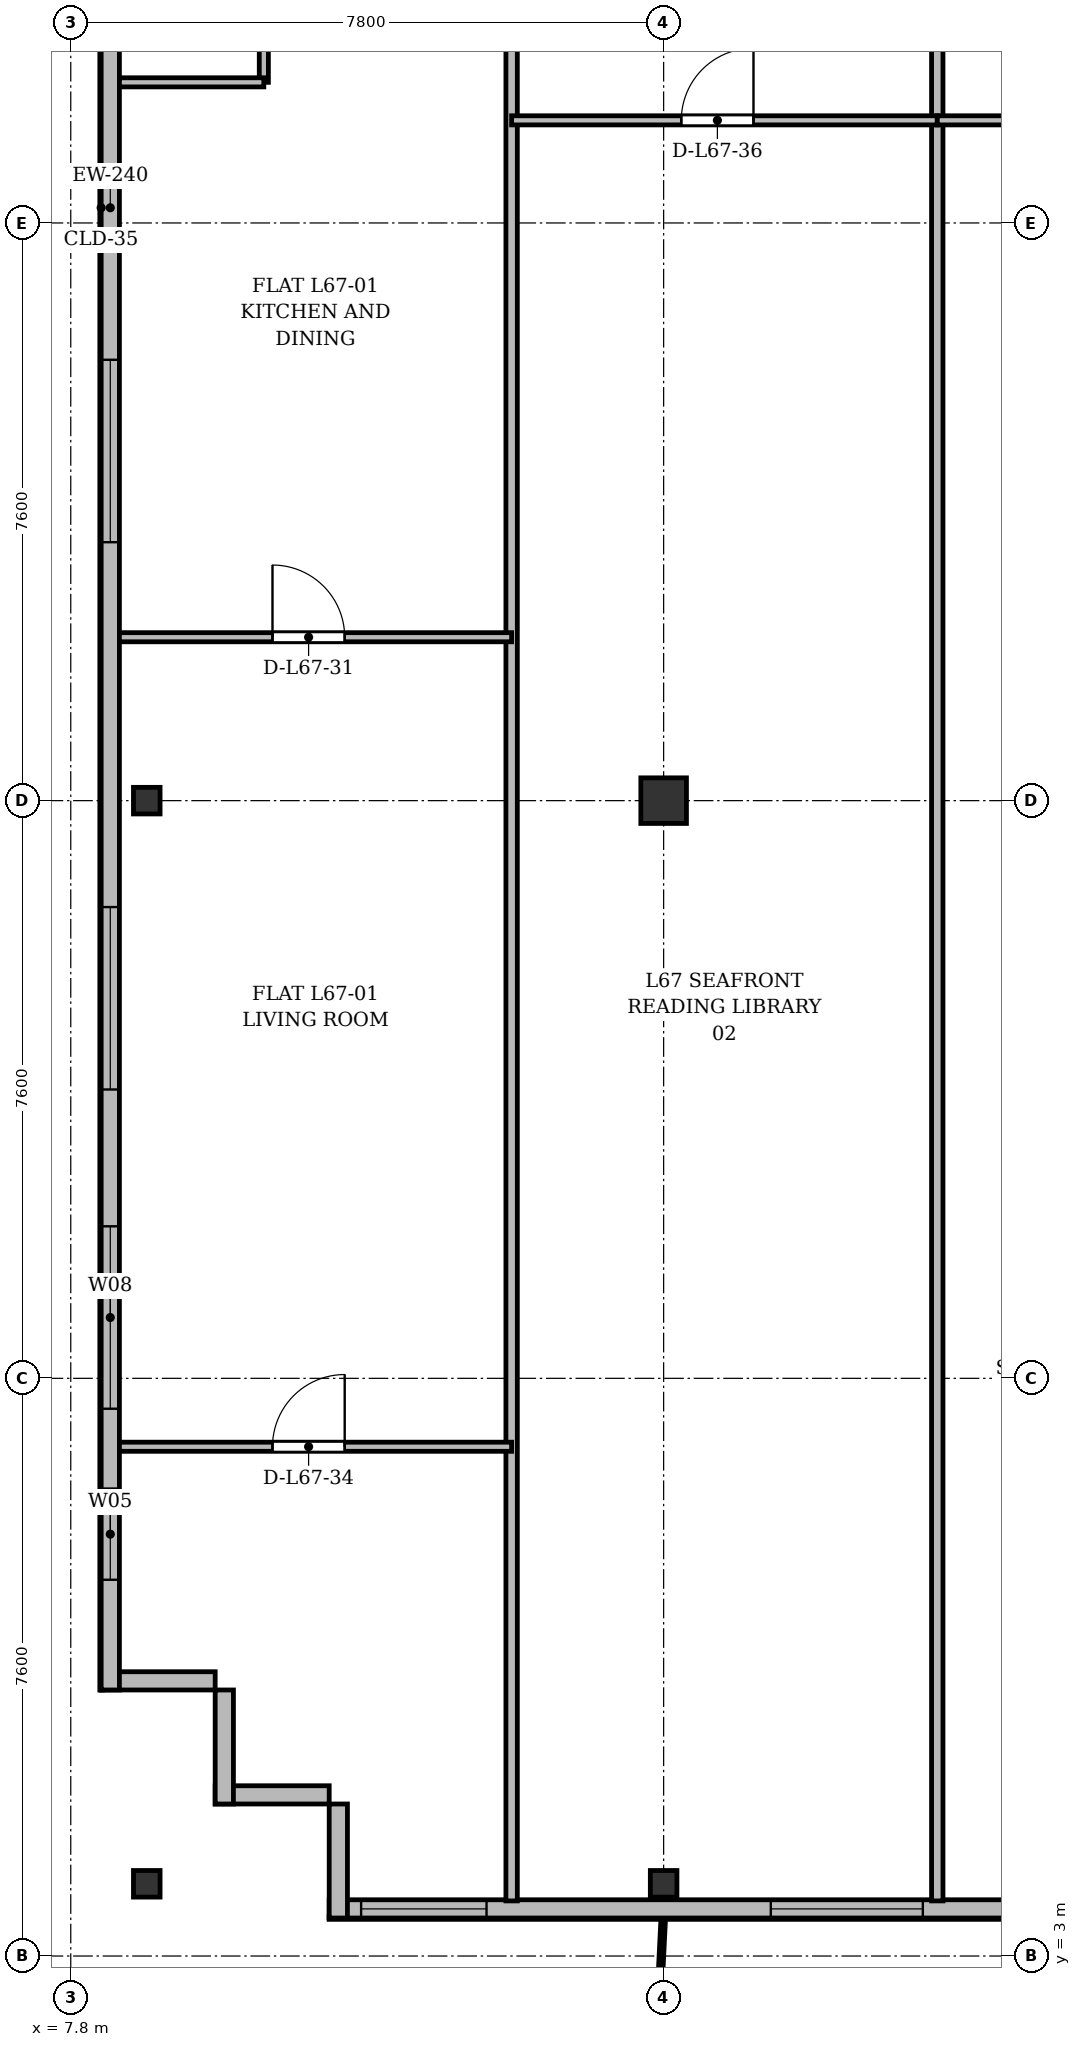
"""IFC4 building model, lengths in metres.
Left out: names, types, materials, properties, quantities, classifications, styles, units other than length and angle.
Written with IfcOpenShell. Run it as: python <this file> out.ifc"""

import sys

from ifc_helpers import new_model, si_unit, direction, frame, frame_2d, origin, origin_2d, place, context, subcontext, project, spatial, rectangle, i_section, extrude, source, transform, mapped, element, fill, save


model = new_model("IFC4")
c1 = context("Model", 3, precision=1e-05, world=origin(), true_north=direction((0.0, 1.0)))
c2 = subcontext(c1, "Body", "Model", "MODEL_VIEW")
j1 = project(units=[si_unit("LENGTHUNIT", "METRE"), si_unit("PLANEANGLEUNIT", "RADIAN")], contexts=[c1])
p1 = place(None, origin())
s1 = spatial("IfcSite", under=j1, at=p1, CompositionType="ELEMENT")
p2 = place(p1, origin())
s2 = spatial("IfcBuilding", under=s1, at=p2, CompositionType="ELEMENT")
p3 = place(p2, frame((0.0, 0.0, 259.5)))
s3 = spatial("IfcBuildingStorey", under=s2, at=p3, CompositionType="ELEMENT", Elevation=259.5)
m1 = source(origin(), c2, "Body", "SweptSolid", [
    extrude(i_section(OverallWidth=0.35, OverallDepth=0.35, WebThickness=0.018, FlangeThickness=0.028, at=origin_2d()), origin(), (0.0, 0.0, 1.0), 3.6),
])
for number, where, z_axis, x_axis in (
    (1, (8.8, 3.95, 0.0), (0.0, 0.0, 1.0), (1.0, 0.0, 0.0)),
    (2, (8.8, 18.2, 0.0), (0.0, 0.0, 1.0), (1.0, 0.0, 0.0)),
    (3, (15.6, 3.95, 0.0), (0.0, 0.0, 1.0), (1.0, 0.0, 0.0)),
):
    element("IfcColumn", number, at=place(p3, frame(where, z_axis=z_axis, x_axis=x_axis)), inside=s3, PredefinedType="COLUMN", context=c2, shape_type="MappedRepresentation", body=[
        mapped(m1, transform((0.0, 0.0, 0.0), x_axis=(1.0, 0.0, 0.0), y_axis=(0.0, 1.0, 0.0), z_axis=(0.0, 0.0, 1.0), scale=1.0)),
    ])
m2 = source(origin(), c2, "Body", "SweptSolid", [
    extrude(rectangle(XDim=0.6, YDim=0.6, at=origin_2d()), origin(), (0.0, 0.0, 1.0), 3.6),
])
p4 = place(p3, frame((15.6, 18.2, 0.0), z_axis=(0.0, 0.0, 1.0), x_axis=(1.0, 0.0, 0.0)))
e4 = element("IfcColumn", 4, at=p4, inside=s3, PredefinedType="COLUMN", context=c2, shape_type="MappedRepresentation", body=[
    mapped(m2, transform((0.0, 0.0, 0.0), x_axis=(1.0, 0.0, 0.0), y_axis=(0.0, 1.0, 0.0), z_axis=(0.0, 0.0, 1.0), scale=1.0)),
])
for number, where, z_axis, x_axis in (
    (5, (11.2, 5.12, 0.0), (0.0, 0.0, 1.0), (-1.0, 0.0, 0.0)),
    (6, (9.82, 5.0, 0.0), (0.0, 0.0, 1.0), (0.0, 1.0, 0.0)),
):
    element("IfcWall", number, at=place(p3, frame(where, z_axis=z_axis, x_axis=x_axis)), inside=s3, PredefinedType="SOLIDWALL", context=c2, shape_type="SweptSolid", body=[
        extrude(rectangle(XDim=1.5, YDim=0.24, at=frame_2d((0.75, 0.0))), origin(), (0.0, 0.0, 1.0), 3.37),
    ])
p5 = place(p3, frame((9.7, 6.62, 0.0), z_axis=(0.0, 0.0, 1.0), x_axis=(-1.0, 0.0, 0.0)))
e7 = element("IfcWall", 7, at=p5, inside=s3, PredefinedType="SOLIDWALL", context=c2, shape_type="SweptSolid", body=[
    extrude(rectangle(XDim=1.5, YDim=0.24, at=frame_2d((0.75, 0.0))), origin(), (0.0, 0.0, 1.0), 2.87),
])
p6 = place(p3, frame((8.32, 6.5, 0.0), z_axis=(0.0, 0.0, 1.0), x_axis=(0.0, 1.0, 0.0)))
e8 = element("IfcWall", 8, at=p6, inside=s3, PredefinedType="SOLIDWALL", context=c2, shape_type="SweptSolid", body=[
    extrude(rectangle(XDim=39.0, YDim=0.24, at=frame_2d((19.5, 0.0))), origin(), (0.0, 0.0, 1.0), 3.37),
])
p7 = place(p6, frame((1.45, 0.0, 0.92)))
e9 = element("IfcOpeningElement", 9, at=p7, cuts=e8, PredefinedType="OPENING", context=c2, shape_type="SweptSolid", body=[
    extrude(rectangle(XDim=1.2, YDim=1.65, at=frame_2d((0.6, 0.825))), frame((0.0, 0.13, 0.0), z_axis=(0.0, -1.0, 0.0), x_axis=(1.0, 0.0, 0.0)), (0.0, 0.0, 1.0), 0.26),
])
p8 = place(p6, frame((3.7, 0.0, 0.92)))
e10 = element("IfcOpeningElement", 10, at=p8, cuts=e8, PredefinedType="OPENING", context=c2, shape_type="SweptSolid", body=[
    extrude(rectangle(XDim=2.4, YDim=2.1, at=frame_2d((1.2, 1.05))), frame((0.0, 0.13, 0.0), z_axis=(0.0, -1.0, 0.0), x_axis=(1.0, 0.0, 0.0)), (0.0, 0.0, 1.0), 0.26),
])
p9 = place(p6, frame((7.9, 0.0, 0.92)))
e11 = element("IfcOpeningElement", 11, at=p9, cuts=e8, PredefinedType="OPENING", context=c2, shape_type="SweptSolid", body=[
    extrude(rectangle(XDim=2.4, YDim=2.1, at=frame_2d((1.2, 1.05))), frame((0.0, 0.13, 0.0), z_axis=(0.0, -1.0, 0.0), x_axis=(1.0, 0.0, 0.0)), (0.0, 0.0, 1.0), 0.26),
])
p10 = place(p6, frame((15.1, 0.0, 0.92)))
e12 = element("IfcOpeningElement", 12, at=p10, cuts=e8, PredefinedType="OPENING", context=c2, shape_type="SweptSolid", body=[
    extrude(rectangle(XDim=2.4, YDim=2.1, at=frame_2d((1.2, 1.05))), frame((0.0, 0.13, 0.0), z_axis=(0.0, -1.0, 0.0), x_axis=(1.0, 0.0, 0.0)), (0.0, 0.0, 1.0), 0.26),
])
p11 = place(p6, frame((33.3, 0.0, 0.92)))
e13 = element("IfcOpeningElement", 13, at=p11, cuts=e8, PredefinedType="OPENING", context=c2, shape_type="SweptSolid", body=[
    extrude(rectangle(XDim=1.2, YDim=1.65, at=frame_2d((0.6, 0.825))), frame((0.0, 0.13, 0.0), z_axis=(0.0, -1.0, 0.0), x_axis=(1.0, 0.0, 0.0)), (0.0, 0.0, 1.0), 0.26),
])
p12 = place(p6, frame((36.65, 0.0, 0.92)))
e14 = element("IfcOpeningElement", 14, at=p12, cuts=e8, PredefinedType="OPENING", context=c2, shape_type="SweptSolid", body=[
    extrude(rectangle(XDim=1.2, YDim=1.65, at=frame_2d((0.6, 0.825))), frame((0.0, 0.13, 0.0), z_axis=(0.0, -1.0, 0.0), x_axis=(1.0, 0.0, 0.0)), (0.0, 0.0, 1.0), 0.26),
])
p13 = place(p3, frame((63.2, 3.62, 0.0), z_axis=(0.0, 0.0, 1.0), x_axis=(-1.0, 0.0, 0.0)))
e15 = element("IfcWall", 15, at=p13, inside=s3, PredefinedType="SOLIDWALL", context=c2, shape_type="SweptSolid", body=[
    extrude(rectangle(XDim=52.0, YDim=0.24, at=frame_2d((26.0, 0.0))), origin(), (0.0, 0.0, 1.0), 3.37),
])
p14 = place(p13, frame((0.345, 0.0, 0.9)))
e16 = element("IfcOpeningElement", 16, at=p14, cuts=e15, PredefinedType="OPENING", context=c2, shape_type="SweptSolid", body=[
    extrude(rectangle(XDim=1.2, YDim=1.65, at=frame_2d((0.6, 0.825))), frame((0.0, 0.13, 0.0), z_axis=(0.0, -1.0, 0.0), x_axis=(1.0, 0.0, 0.0)), (0.0, 0.0, 1.0), 0.26),
])
p15 = place(p13, frame((2.05, 0.0, 0.9)))
e17 = element("IfcOpeningElement", 17, at=p15, cuts=e15, PredefinedType="OPENING", context=c2, shape_type="SweptSolid", body=[
    extrude(rectangle(XDim=2.0, YDim=1.95, at=frame_2d((1.0, 0.975))), frame((0.0, 0.13, 0.0), z_axis=(0.0, -1.0, 0.0), x_axis=(1.0, 0.0, 0.0)), (0.0, 0.0, 1.0), 0.26),
])
p16 = place(p13, frame((5.42, 0.0, 0.0)))
e18 = element("IfcOpeningElement", 18, at=p16, cuts=e15, PredefinedType="OPENING", context=c2, shape_type="SweptSolid", body=[
    extrude(rectangle(XDim=1.2, YDim=2.2, at=frame_2d((0.6, 1.1))), frame((0.0, 0.13, 0.0), z_axis=(0.0, -1.0, 0.0), x_axis=(1.0, 0.0, 0.0)), (0.0, 0.0, 1.0), 0.26),
])
p17 = place(p13, frame((8.6, 0.0, 0.9)))
e19 = element("IfcOpeningElement", 19, at=p17, cuts=e15, PredefinedType="OPENING", context=c2, shape_type="SweptSolid", body=[
    extrude(rectangle(XDim=1.8, YDim=1.8, at=frame_2d((0.9, 0.9))), frame((0.0, 0.13, 0.0), z_axis=(0.0, -1.0, 0.0), x_axis=(1.0, 0.0, 0.0)), (0.0, 0.0, 1.0), 0.26),
])
p18 = place(p13, frame((14.7, 0.0, 0.9)))
e20 = element("IfcOpeningElement", 20, at=p18, cuts=e15, PredefinedType="OPENING", context=c2, shape_type="SweptSolid", body=[
    extrude(rectangle(XDim=2.2, YDim=1.8, at=frame_2d((1.1, 0.9))), frame((0.0, 0.13, 0.0), z_axis=(0.0, -1.0, 0.0), x_axis=(1.0, 0.0, 0.0)), (0.0, 0.0, 1.0), 0.26),
])
p19 = place(p13, frame((20.5, 0.0, 0.9)))
e21 = element("IfcOpeningElement", 21, at=p19, cuts=e15, PredefinedType="OPENING", context=c2, shape_type="SweptSolid", body=[
    extrude(rectangle(XDim=1.5, YDim=1.75, at=frame_2d((0.75, 0.875))), frame((0.0, 0.13, 0.0), z_axis=(0.0, -1.0, 0.0), x_axis=(1.0, 0.0, 0.0)), (0.0, 0.0, 1.0), 0.26),
])
p20 = place(p13, frame((23.95, 0.0, 0.9)))
e22 = element("IfcOpeningElement", 22, at=p20, cuts=e15, PredefinedType="OPENING", context=c2, shape_type="SweptSolid", body=[
    extrude(rectangle(XDim=2.0, YDim=1.95, at=frame_2d((1.0, 0.975))), frame((0.0, 0.13, 0.0), z_axis=(0.0, -1.0, 0.0), x_axis=(1.0, 0.0, 0.0)), (0.0, 0.0, 1.0), 0.26),
])
p21 = place(p13, frame((28.875, 0.0, 0.9)))
e23 = element("IfcOpeningElement", 23, at=p21, cuts=e15, PredefinedType="OPENING", context=c2, shape_type="SweptSolid", body=[
    extrude(rectangle(XDim=1.65, YDim=1.85, at=frame_2d((0.825, 0.925))), frame((0.0, 0.13, 0.0), z_axis=(0.0, -1.0, 0.0), x_axis=(1.0, 0.0, 0.0)), (0.0, 0.0, 1.0), 0.26),
])
p22 = place(p13, frame((34.078, 0.0, 0.0)))
e24 = element("IfcOpeningElement", 24, at=p22, cuts=e15, PredefinedType="OPENING", context=c2, shape_type="SweptSolid", body=[
    extrude(rectangle(XDim=1.2, YDim=2.2, at=frame_2d((0.6, 1.1))), frame((0.0, 0.13, 0.0), z_axis=(0.0, -1.0, 0.0), x_axis=(1.0, 0.0, 0.0)), (0.0, 0.0, 1.0), 0.26),
])
p23 = place(p13, frame((36.9, 0.0, 0.9)))
e25 = element("IfcOpeningElement", 25, at=p23, cuts=e15, PredefinedType="OPENING", context=c2, shape_type="SweptSolid", body=[
    extrude(rectangle(XDim=2.2, YDim=1.8, at=frame_2d((1.1, 0.9))), frame((0.0, 0.13, 0.0), z_axis=(0.0, -1.0, 0.0), x_axis=(1.0, 0.0, 0.0)), (0.0, 0.0, 1.0), 0.26),
])
p24 = place(p13, frame((41.15, 0.0, 0.9)))
e26 = element("IfcOpeningElement", 26, at=p24, cuts=e15, PredefinedType="OPENING", context=c2, shape_type="SweptSolid", body=[
    extrude(rectangle(XDim=1.5, YDim=1.75, at=frame_2d((0.75, 0.875))), frame((0.0, 0.13, 0.0), z_axis=(0.0, -1.0, 0.0), x_axis=(1.0, 0.0, 0.0)), (0.0, 0.0, 1.0), 0.26),
])
p25 = place(p13, frame((44.19, 0.0, 0.9)))
e27 = element("IfcOpeningElement", 27, at=p25, cuts=e15, PredefinedType="OPENING", context=c2, shape_type="SweptSolid", body=[
    extrude(rectangle(XDim=2.0, YDim=1.95, at=frame_2d((1.0, 0.975))), frame((0.0, 0.13, 0.0), z_axis=(0.0, -1.0, 0.0), x_axis=(1.0, 0.0, 0.0)), (0.0, 0.0, 1.0), 0.26),
])
p26 = place(p13, frame((49.93, 0.0, 0.9)))
e28 = element("IfcOpeningElement", 28, at=p26, cuts=e15, PredefinedType="OPENING", context=c2, shape_type="SweptSolid", body=[
    extrude(rectangle(XDim=1.65, YDim=1.85, at=frame_2d((0.825, 0.925))), frame((0.0, 0.13, 0.0), z_axis=(0.0, -1.0, 0.0), x_axis=(1.0, 0.0, 0.0)), (0.0, 0.0, 1.0), 0.26),
])
p27 = place(p3, frame((11.32, 3.5, 0.0), z_axis=(0.0, 0.0, 1.0), x_axis=(0.0, 1.0, 0.0)))
e29 = element("IfcWall", 29, at=p27, inside=s3, PredefinedType="SOLIDWALL", context=c2, shape_type="SweptSolid", body=[
    extrude(rectangle(XDim=1.5, YDim=0.24, at=frame_2d((0.75, 0.0))), origin(), (0.0, 0.0, 1.0), 2.92),
])
for number, where, z_axis, x_axis in (
    (30, (13.6, 3.725, 0.0), (0.0, 0.0, 1.0), (0.0, 1.0, 0.0)),
    (31, (19.2, 3.725, 0.0), (0.0, 0.0, 1.0), (0.0, 1.0, 0.0)),
):
    element("IfcWall", number, at=place(p3, frame(where, z_axis=z_axis, x_axis=x_axis)), inside=s3, PredefinedType="PARTITIONING", context=c2, shape_type="SweptSolid", body=[
        extrude(rectangle(XDim=27.275, YDim=0.15, at=frame_2d((13.637, 0.0))), origin(), (0.0, 0.0, 1.0), 2.92),
    ])
p28 = place(p3, frame((8.44, 20.35, 0.0), z_axis=(0.0, 0.0, 1.0), x_axis=(1.0, 0.0, 0.0)))
e32 = element("IfcWall", 32, at=p28, inside=s3, PredefinedType="PARTITIONING", context=c2, shape_type="SweptSolid", body=[
    extrude(rectangle(XDim=5.16, YDim=0.12, at=frame_2d((2.58, 0.0))), origin(), (0.0, 0.0, 1.0), 2.87),
])
p29 = place(p28, frame((2.014, 0.0, 0.0)))
e33 = element("IfcOpeningElement", 33, at=p29, cuts=e32, PredefinedType="OPENING", context=c2, shape_type="SweptSolid", body=[
    extrude(rectangle(XDim=0.95, YDim=2.15, at=frame_2d((0.475, 1.075))), frame((0.0, 0.07, 0.0), z_axis=(0.0, -1.0, 0.0), x_axis=(1.0, 0.0, 0.0)), (0.0, 0.0, 1.0), 0.14),
])
p30 = place(p3, frame((10.34, 27.65, 0.0), z_axis=(0.0, 0.0, 1.0), x_axis=(0.0, 1.0, 0.0)))
e34 = element("IfcWall", 34, at=p30, inside=s3, PredefinedType="PARTITIONING", context=c2, shape_type="SweptSolid", body=[
    extrude(rectangle(XDim=3.35, YDim=0.12, at=frame_2d((1.675, 0.0))), origin(), (0.0, 0.0, 1.0), 3.37),
])
p31 = place(p30, frame((0.8, 0.0, 0.0)))
e35 = element("IfcOpeningElement", 35, at=p31, cuts=e34, PredefinedType="OPENING", context=c2, shape_type="SweptSolid", body=[
    extrude(rectangle(XDim=0.85, YDim=2.1, at=frame_2d((0.425, 1.05))), frame((0.0, 0.07, 0.0), z_axis=(0.0, -1.0, 0.0), x_axis=(1.0, 0.0, 0.0)), (0.0, 0.0, 1.0), 0.14),
])
p32 = place(p3, frame((8.44, 27.65, 0.0), z_axis=(0.0, 0.0, 1.0), x_axis=(1.0, 0.0, 0.0)))
e36 = element("IfcWall", 36, at=p32, inside=s3, PredefinedType="PARTITIONING", context=c2, shape_type="SweptSolid", body=[
    extrude(rectangle(XDim=1.9, YDim=0.12, at=frame_2d((0.95, 0.0))), origin(), (0.0, 0.0, 1.0), 2.87),
])
p33 = place(p3, frame((8.44, 9.7, 0.0), z_axis=(0.0, 0.0, 1.0), x_axis=(1.0, 0.0, 0.0)))
e37 = element("IfcWall", 37, at=p33, inside=s3, PredefinedType="PARTITIONING", context=c2, shape_type="SweptSolid", body=[
    extrude(rectangle(XDim=5.16, YDim=0.12, at=frame_2d((2.58, 0.0))), origin(), (0.0, 0.0, 1.0), 2.87),
])
p34 = place(p33, frame((2.014, 0.0, 0.0)))
e38 = element("IfcOpeningElement", 38, at=p34, cuts=e37, PredefinedType="OPENING", context=c2, shape_type="SweptSolid", body=[
    extrude(rectangle(XDim=0.95, YDim=2.15, at=frame_2d((0.475, 1.075))), frame((0.0, 0.07, 0.0), z_axis=(0.0, -1.0, 0.0), x_axis=(1.0, 0.0, 0.0)), (0.0, 0.0, 1.0), 0.14),
])
p35 = place(p3, frame((13.6, 27.15, 0.0), z_axis=(0.0, 0.0, 1.0), x_axis=(1.0, 0.0, 0.0)))
e39 = element("IfcWall", 39, at=p35, inside=s3, PredefinedType="PARTITIONING", context=c2, shape_type="SweptSolid", body=[
    extrude(rectangle(XDim=5.6, YDim=0.12, at=frame_2d((2.8, 0.0))), origin(), (0.0, 0.0, 1.0), 2.87),
])
p36 = place(p35, frame((2.232, 0.0, 0.0)))
e40 = element("IfcOpeningElement", 40, at=p36, cuts=e39, PredefinedType="OPENING", context=c2, shape_type="SweptSolid", body=[
    extrude(rectangle(XDim=0.95, YDim=2.15, at=frame_2d((0.475, 1.075))), frame((0.0, 0.07, 0.0), z_axis=(0.0, -1.0, 0.0), x_axis=(1.0, 0.0, 0.0)), (0.0, 0.0, 1.0), 0.14),
])
p37 = place(p3, frame((19.2, 27.15, 0.0), z_axis=(0.0, 0.0, 1.0), x_axis=(1.0, 0.0, 0.0)))
e41 = element("IfcWall", 41, at=p37, inside=s3, PredefinedType="PARTITIONING", context=c2, shape_type="SweptSolid", body=[
    extrude(rectangle(XDim=4.2, YDim=0.12, at=frame_2d((2.1, 0.0))), origin(), (0.0, 0.0, 1.0), 2.87),
])
p38 = place(p37, frame((1.529, 0.0, 0.0)))
e42 = element("IfcOpeningElement", 42, at=p38, cuts=e41, PredefinedType="OPENING", context=c2, shape_type="SweptSolid", body=[
    extrude(rectangle(XDim=0.95, YDim=2.15, at=frame_2d((0.475, 1.075))), frame((0.0, 0.07, 0.0), z_axis=(0.0, -1.0, 0.0), x_axis=(1.0, 0.0, 0.0)), (0.0, 0.0, 1.0), 0.14),
])
m3 = source(origin(), c2, "Body", "SweptSolid", [
    extrude(rectangle(XDim=1.2, YDim=1.65, at=frame_2d((0.6, 0.825))), frame((0.0, 0.03, 0.0), z_axis=(0.0, -1.0, 0.0), x_axis=(1.0, 0.0, 0.0)), (0.0, 0.0, 1.0), 0.06),
])
p39 = place(p7, origin())
e43 = element("IfcWindow", 43, at=p39, inside=s3, PartitioningType="SINGLE_PANEL", PredefinedType="WINDOW", context=c2, shape_type="MappedRepresentation", body=[
    mapped(m3, transform((0.0, 0.0, 0.0), x_axis=(1.0, 0.0, 0.0), y_axis=(0.0, 1.0, 0.0), z_axis=(0.0, 0.0, 1.0), scale=1.0)),
])
fill(e9, e43)
m4 = source(origin(), c2, "Body", "SweptSolid", [
    extrude(rectangle(XDim=2.4, YDim=2.1, at=frame_2d((1.2, 1.05))), frame((0.0, 0.03, 0.0), z_axis=(0.0, -1.0, 0.0), x_axis=(1.0, 0.0, 0.0)), (0.0, 0.0, 1.0), 0.06),
])
p40 = place(p8, origin())
e44 = element("IfcWindow", 44, at=p40, inside=s3, PartitioningType="SINGLE_PANEL", PredefinedType="WINDOW", context=c2, shape_type="MappedRepresentation", body=[
    mapped(m4, transform((0.0, 0.0, 0.0), x_axis=(1.0, 0.0, 0.0), y_axis=(0.0, 1.0, 0.0), z_axis=(0.0, 0.0, 1.0), scale=1.0)),
])
fill(e10, e44)
p41 = place(p9, origin())
e45 = element("IfcWindow", 45, at=p41, inside=s3, PartitioningType="SINGLE_PANEL", PredefinedType="WINDOW", context=c2, shape_type="MappedRepresentation", body=[
    mapped(m4, transform((0.0, 0.0, 0.0), x_axis=(1.0, 0.0, 0.0), y_axis=(0.0, 1.0, 0.0), z_axis=(0.0, 0.0, 1.0), scale=1.0)),
])
fill(e11, e45)
p42 = place(p10, origin())
e46 = element("IfcWindow", 46, at=p42, inside=s3, PartitioningType="SINGLE_PANEL", PredefinedType="WINDOW", context=c2, shape_type="MappedRepresentation", body=[
    mapped(m4, transform((0.0, 0.0, 0.0), x_axis=(1.0, 0.0, 0.0), y_axis=(0.0, 1.0, 0.0), z_axis=(0.0, 0.0, 1.0), scale=1.0)),
])
fill(e12, e46)
m5 = source(origin(), c2, "Body", "SweptSolid", [
    extrude(rectangle(XDim=2.0, YDim=1.95, at=frame_2d((1.0, 0.975))), frame((0.0, 0.03, 0.0), z_axis=(0.0, -1.0, 0.0), x_axis=(1.0, 0.0, 0.0)), (0.0, 0.0, 1.0), 0.06),
])
p43 = place(p25, origin())
e47 = element("IfcWindow", 47, at=p43, inside=s3, PartitioningType="SINGLE_PANEL", PredefinedType="WINDOW", context=c2, shape_type="MappedRepresentation", body=[
    mapped(m5, transform((0.0, 0.0, 0.0), x_axis=(1.0, 0.0, 0.0), y_axis=(0.0, 1.0, 0.0), z_axis=(0.0, 0.0, 1.0), scale=1.0)),
])
fill(e27, e47)
m6 = source(origin(), c2, "Body", "SweptSolid", [
    extrude(rectangle(XDim=1.65, YDim=1.85, at=frame_2d((0.825, 0.925))), frame((0.0, 0.03, 0.0), z_axis=(0.0, -1.0, 0.0), x_axis=(1.0, 0.0, 0.0)), (0.0, 0.0, 1.0), 0.06),
])
p44 = place(p26, origin())
e48 = element("IfcWindow", 48, at=p44, inside=s3, PartitioningType="SINGLE_PANEL", PredefinedType="WINDOW", context=c2, shape_type="MappedRepresentation", body=[
    mapped(m6, transform((0.0, 0.0, 0.0), x_axis=(1.0, 0.0, 0.0), y_axis=(0.0, 1.0, 0.0), z_axis=(0.0, 0.0, 1.0), scale=1.0)),
])
fill(e28, e48)
m7 = source(origin(), c2, "Body", "SweptSolid", [
    extrude(rectangle(XDim=0.95, YDim=2.15, at=frame_2d((0.475, 1.075))), frame((0.0, 0.025, 0.0), z_axis=(0.0, -1.0, 0.0), x_axis=(1.0, 0.0, 0.0)), (0.0, 0.0, 1.0), 0.05),
])
p45 = place(p29, origin())
e49 = element("IfcDoor", 49, at=p45, inside=s3, OperationType="SINGLE_SWING_LEFT", PredefinedType="DOOR", context=c2, shape_type="MappedRepresentation", body=[
    mapped(m7, transform((0.0, 0.0, 0.0), x_axis=(1.0, 0.0, 0.0), y_axis=(0.0, 1.0, 0.0), z_axis=(0.0, 0.0, 1.0), scale=1.0)),
])
fill(e33, e49)
p46 = place(p34, origin())
e50 = element("IfcDoor", 50, at=p46, inside=s3, OperationType="SINGLE_SWING_RIGHT", PredefinedType="DOOR", context=c2, shape_type="MappedRepresentation", body=[
    mapped(m7, transform((0.0, 0.0, 0.0), x_axis=(1.0, 0.0, 0.0), y_axis=(0.0, 1.0, 0.0), z_axis=(0.0, 0.0, 1.0), scale=1.0)),
])
fill(e38, e50)
p47 = place(p36, origin())
e51 = element("IfcDoor", 51, at=p47, inside=s3, OperationType="SINGLE_SWING_RIGHT", PredefinedType="DOOR", context=c2, shape_type="MappedRepresentation", body=[
    mapped(m7, transform((0.0, 0.0, 0.0), x_axis=(1.0, 0.0, 0.0), y_axis=(0.0, 1.0, 0.0), z_axis=(0.0, 0.0, 1.0), scale=1.0)),
])
fill(e40, e51)
save(model, sys.argv[1])
